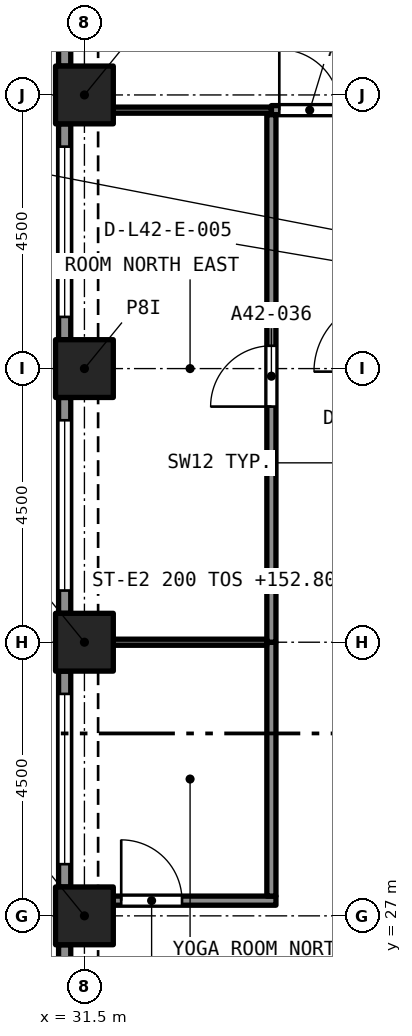
"""IFC4 building model, lengths in metres.
Left out: names, types, materials, properties, quantities, classifications, styles, units other than length and angle.
Written with IfcOpenShell. Run it as: python <this file> out.ifc"""

import sys

from ifc_helpers import new_model, si_unit, direction, frame, frame_2d, origin, origin_2d, place, context, subcontext, project, spatial, rectangle, extrude, element, fill, save


model = new_model("IFC4")
c1 = context("Model", 3, precision=1e-05, world=origin(), true_north=direction((0.0, 1.0)))
c2 = subcontext(c1, "Body", "Model", "MODEL_VIEW")
j1 = project(units=[si_unit("LENGTHUNIT", "METRE"), si_unit("PLANEANGLEUNIT", "RADIAN")], contexts=[c1])
p1 = place(None, origin())
s1 = spatial("IfcSite", under=j1, at=p1, CompositionType="ELEMENT")
p2 = place(p1, origin())
s2 = spatial("IfcBuilding", under=s1, at=p2, CompositionType="ELEMENT")
p3 = place(p2, frame((0.0, 0.0, 150.6)))
s3 = spatial("IfcBuildingStorey", under=s2, at=p3, CompositionType="ELEMENT", Elevation=150.6)
for number, where, z_axis, x_axis in (
    (1, (31.5, 27.0, 0.0), (0.0, 0.0, 1.0), (1.0, 0.0, 0.0)),
    (2, (31.5, 31.5, 0.0), (0.0, 0.0, 1.0), (1.0, 0.0, 0.0)),
    (3, (31.5, 36.0, 0.0), (0.0, 0.0, 1.0), (1.0, 0.0, 0.0)),
    (4, (31.5, 40.5, 0.0), (0.0, 0.0, 1.0), (1.0, 0.0, 0.0)),
):
    element("IfcColumn", number, at=place(p3, frame(where, z_axis=z_axis, x_axis=x_axis)), inside=s3, PredefinedType="COLUMN", context=c2, shape_type="SweptSolid", body=[
        extrude(rectangle(XDim=0.95, YDim=0.95, at=origin_2d()), origin(), (0.0, 0.0, 1.0), 4.4),
    ])
p4 = place(p3, frame((31.175, 40.975, 0.0), z_axis=(0.0, 0.0, 1.0), x_axis=(0.0, 1.0, 0.0)))
e5 = element("IfcWall", 5, at=p4, inside=s3, PredefinedType="SOLIDWALL", context=c2, shape_type="SweptSolid", body=[
    extrude(rectangle(XDim=3.55, YDim=0.2, at=frame_2d((1.775, 0.0))), origin(), (0.0, 0.0, 1.0), 4.4),
])
p5 = place(p4, frame((0.375, 0.0, 0.45)))
e6 = element("IfcOpeningElement", 6, at=p5, cuts=e5, PredefinedType="OPENING", context=c2, shape_type="SweptSolid", body=[
    extrude(rectangle(XDim=2.8, YDim=2.55, at=frame_2d((1.4, 1.275))), frame((0.0, 0.11, 0.0), z_axis=(0.0, -1.0, 0.0), x_axis=(1.0, 0.0, 0.0)), (0.0, 0.0, 1.0), 0.22),
])
p6 = place(p3, frame((31.175, 36.475, 0.0), z_axis=(0.0, 0.0, 1.0), x_axis=(0.0, 1.0, 0.0)))
e7 = element("IfcWall", 7, at=p6, inside=s3, PredefinedType="SOLIDWALL", context=c2, shape_type="SweptSolid", body=[
    extrude(rectangle(XDim=3.55, YDim=0.2, at=frame_2d((1.775, 0.0))), origin(), (0.0, 0.0, 1.0), 4.4),
])
p7 = place(p6, frame((0.375, 0.0, 0.45)))
e8 = element("IfcOpeningElement", 8, at=p7, cuts=e7, PredefinedType="OPENING", context=c2, shape_type="SweptSolid", body=[
    extrude(rectangle(XDim=2.8, YDim=2.55, at=frame_2d((1.4, 1.275))), frame((0.0, 0.11, 0.0), z_axis=(0.0, -1.0, 0.0), x_axis=(1.0, 0.0, 0.0)), (0.0, 0.0, 1.0), 0.22),
])
p8 = place(p3, frame((31.175, 31.975, 0.0), z_axis=(0.0, 0.0, 1.0), x_axis=(0.0, 1.0, 0.0)))
e9 = element("IfcWall", 9, at=p8, inside=s3, PredefinedType="SOLIDWALL", context=c2, shape_type="SweptSolid", body=[
    extrude(rectangle(XDim=3.55, YDim=0.2, at=frame_2d((1.775, 0.0))), origin(), (0.0, 0.0, 1.0), 4.4),
])
p9 = place(p8, frame((0.375, 0.0, 0.45)))
e10 = element("IfcOpeningElement", 10, at=p9, cuts=e9, PredefinedType="OPENING", context=c2, shape_type="SweptSolid", body=[
    extrude(rectangle(XDim=2.8, YDim=2.55, at=frame_2d((1.4, 1.275))), frame((0.0, 0.11, 0.0), z_axis=(0.0, -1.0, 0.0), x_axis=(1.0, 0.0, 0.0)), (0.0, 0.0, 1.0), 0.22),
])
p10 = place(p3, frame((31.175, 27.475, 0.0), z_axis=(0.0, 0.0, 1.0), x_axis=(0.0, 1.0, 0.0)))
e11 = element("IfcWall", 11, at=p10, inside=s3, PredefinedType="SOLIDWALL", context=c2, shape_type="SweptSolid", body=[
    extrude(rectangle(XDim=3.55, YDim=0.2, at=frame_2d((1.775, 0.0))), origin(), (0.0, 0.0, 1.0), 4.4),
])
p11 = place(p10, frame((0.375, 0.0, 0.45)))
e12 = element("IfcOpeningElement", 12, at=p11, cuts=e11, PredefinedType="OPENING", context=c2, shape_type="SweptSolid", body=[
    extrude(rectangle(XDim=2.8, YDim=2.55, at=frame_2d((1.4, 1.275))), frame((0.0, 0.11, 0.0), z_axis=(0.0, -1.0, 0.0), x_axis=(1.0, 0.0, 0.0)), (0.0, 0.0, 1.0), 0.22),
])
p12 = place(p3, frame((31.175, 22.975, 0.0), z_axis=(0.0, 0.0, 1.0), x_axis=(0.0, 1.0, 0.0)))
e13 = element("IfcWall", 13, at=p12, inside=s3, PredefinedType="SOLIDWALL", context=c2, shape_type="SweptSolid", body=[
    extrude(rectangle(XDim=3.55, YDim=0.2, at=frame_2d((1.775, 0.0))), origin(), (0.0, 0.0, 1.0), 4.4),
])
p13 = place(p12, frame((0.375, 0.0, 0.45)))
e14 = element("IfcOpeningElement", 14, at=p13, cuts=e13, PredefinedType="OPENING", context=c2, shape_type="SweptSolid", body=[
    extrude(rectangle(XDim=2.8, YDim=2.55, at=frame_2d((1.4, 1.275))), frame((0.0, 0.11, 0.0), z_axis=(0.0, -1.0, 0.0), x_axis=(1.0, 0.0, 0.0)), (0.0, 0.0, 1.0), 0.22),
])
p14 = place(p3, frame((34.575, 40.25, 0.0), z_axis=(0.0, 0.0, 1.0), x_axis=(1.0, 0.0, 0.0)))
e15 = element("IfcWall", 15, at=p14, inside=s3, PredefinedType="PARTITIONING", context=c2, shape_type="SweptSolid", body=[
    extrude(rectangle(XDim=1.675, YDim=0.15, at=frame_2d((0.837, 0.0))), origin(), (0.0, 0.0, 1.0), 4.1),
])
p15 = place(p14, frame((0.13, 0.0, 0.0)))
e16 = element("IfcOpeningElement", 16, at=p15, cuts=e15, PredefinedType="OPENING", context=c2, shape_type="SweptSolid", body=[
    extrude(rectangle(XDim=1.0, YDim=2.1, at=frame_2d((0.5, 1.05))), frame((0.0, 0.085, 0.0), z_axis=(0.0, -1.0, 0.0), x_axis=(1.0, 0.0, 0.0)), (0.0, 0.0, 1.0), 0.17),
])
p16 = place(p3, frame((31.975, 40.25, 0.0), z_axis=(0.0, 0.0, 1.0), x_axis=(1.0, 0.0, 0.0)))
e17 = element("IfcWall", 17, at=p16, inside=s3, PredefinedType="PARTITIONING", context=c2, shape_type="SweptSolid", body=[
    extrude(rectangle(XDim=2.6, YDim=0.1, at=frame_2d((1.3, 0.0))), origin(), (0.0, 0.0, 1.0), 4.1),
])
p17 = place(p3, frame((31.975, 27.25, 0.0), z_axis=(0.0, 0.0, 1.0), x_axis=(1.0, 0.0, 0.0)))
e18 = element("IfcWall", 18, at=p17, inside=s3, PredefinedType="PARTITIONING", context=c2, shape_type="SweptSolid", body=[
    extrude(rectangle(XDim=2.675, YDim=0.15, at=frame_2d((1.337, 0.0))), origin(), (0.0, 0.0, 1.0), 4.1),
])
p18 = place(p17, frame((0.13, 0.0, 0.0)))
e19 = element("IfcOpeningElement", 19, at=p18, cuts=e18, PredefinedType="OPENING", context=c2, shape_type="SweptSolid", body=[
    extrude(rectangle(XDim=1.0, YDim=2.1, at=frame_2d((0.5, 1.05))), frame((0.0, 0.085, 0.0), z_axis=(0.0, -1.0, 0.0), x_axis=(1.0, 0.0, 0.0)), (0.0, 0.0, 1.0), 0.17),
])
p19 = place(p3, frame((34.575, 27.325, 0.0), z_axis=(0.0, 0.0, 1.0), x_axis=(0.0, 1.0, 0.0)))
e20 = element("IfcWall", 20, at=p19, inside=s3, PredefinedType="PARTITIONING", context=c2, shape_type="SweptSolid", body=[
    extrude(rectangle(XDim=4.175, YDim=0.15, at=frame_2d((2.087, 0.0))), origin(), (0.0, 0.0, 1.0), 4.1),
])
p20 = place(p3, frame((34.575, 31.5, 0.0), z_axis=(0.0, 0.0, 1.0), x_axis=(0.0, 1.0, 0.0)))
e21 = element("IfcWall", 21, at=p20, inside=s3, PredefinedType="PARTITIONING", context=c2, shape_type="SweptSolid", body=[
    extrude(rectangle(XDim=8.675, YDim=0.15, at=frame_2d((4.337, 0.0))), origin(), (0.0, 0.0, 1.0), 4.1),
])
p21 = place(p20, frame((3.875, 0.0, 0.0)))
e22 = element("IfcOpeningElement", 22, at=p21, cuts=e21, PredefinedType="OPENING", context=c2, shape_type="SweptSolid", body=[
    extrude(rectangle(XDim=1.0, YDim=2.1, at=frame_2d((0.5, 1.05))), frame((0.0, 0.085, 0.0), z_axis=(0.0, -1.0, 0.0), x_axis=(1.0, 0.0, 0.0)), (0.0, 0.0, 1.0), 0.17),
])
p22 = place(p3, frame((31.975, 31.5, 0.0), z_axis=(0.0, 0.0, 1.0), x_axis=(1.0, 0.0, 0.0)))
e23 = element("IfcWall", 23, at=p22, inside=s3, PredefinedType="PARTITIONING", context=c2, shape_type="SweptSolid", body=[
    extrude(rectangle(XDim=2.525, YDim=0.1, at=frame_2d((1.262, 0.0))), origin(), (0.0, 0.0, 1.0), 4.1),
])
p23 = place(p7, origin())
e24 = element("IfcWindow", 24, at=p23, inside=s3, PartitioningType="SINGLE_PANEL", PredefinedType="WINDOW", context=c2, shape_type="SweptSolid", body=[
    extrude(rectangle(XDim=2.8, YDim=2.55, at=frame_2d((1.4, 1.275))), frame((0.0, 0.03, 0.0), z_axis=(0.0, -1.0, 0.0), x_axis=(1.0, 0.0, 0.0)), (0.0, 0.0, 1.0), 0.06),
])
fill(e8, e24)
p24 = place(p9, origin())
e25 = element("IfcWindow", 25, at=p24, inside=s3, PartitioningType="SINGLE_PANEL", PredefinedType="WINDOW", context=c2, shape_type="SweptSolid", body=[
    extrude(rectangle(XDim=2.8, YDim=2.55, at=frame_2d((1.4, 1.275))), frame((0.0, 0.03, 0.0), z_axis=(0.0, -1.0, 0.0), x_axis=(1.0, 0.0, 0.0)), (0.0, 0.0, 1.0), 0.06),
])
fill(e10, e25)
p25 = place(p11, origin())
e26 = element("IfcWindow", 26, at=p25, inside=s3, PartitioningType="SINGLE_PANEL", PredefinedType="WINDOW", context=c2, shape_type="SweptSolid", body=[
    extrude(rectangle(XDim=2.8, YDim=2.55, at=frame_2d((1.4, 1.275))), frame((0.0, 0.03, 0.0), z_axis=(0.0, -1.0, 0.0), x_axis=(1.0, 0.0, 0.0)), (0.0, 0.0, 1.0), 0.06),
])
fill(e12, e26)
p26 = place(p15, origin())
e27 = element("IfcDoor", 27, at=p26, inside=s3, OperationType="SINGLE_SWING_LEFT", PredefinedType="DOOR", context=c2, shape_type="SweptSolid", body=[
    extrude(rectangle(XDim=1.0, YDim=2.1, at=frame_2d((0.5, 1.05))), frame((0.0, 0.025, 0.0), z_axis=(0.0, -1.0, 0.0), x_axis=(1.0, 0.0, 0.0)), (0.0, 0.0, 1.0), 0.05),
])
fill(e16, e27)
p27 = place(p18, origin())
e28 = element("IfcDoor", 28, at=p27, inside=s3, OperationType="SINGLE_SWING_LEFT", PredefinedType="DOOR", context=c2, shape_type="SweptSolid", body=[
    extrude(rectangle(XDim=1.0, YDim=2.1, at=frame_2d((0.5, 1.05))), frame((0.0, 0.025, 0.0), z_axis=(0.0, -1.0, 0.0), x_axis=(1.0, 0.0, 0.0)), (0.0, 0.0, 1.0), 0.05),
])
fill(e19, e28)
p28 = place(p21, origin())
e29 = element("IfcDoor", 29, at=p28, inside=s3, OperationType="SINGLE_SWING_RIGHT", PredefinedType="DOOR", context=c2, shape_type="SweptSolid", body=[
    extrude(rectangle(XDim=1.0, YDim=2.1, at=frame_2d((0.5, 1.05))), frame((0.0, 0.025, 0.0), z_axis=(0.0, -1.0, 0.0), x_axis=(1.0, 0.0, 0.0)), (0.0, 0.0, 1.0), 0.05),
])
fill(e22, e29)
save(model, sys.argv[1])
